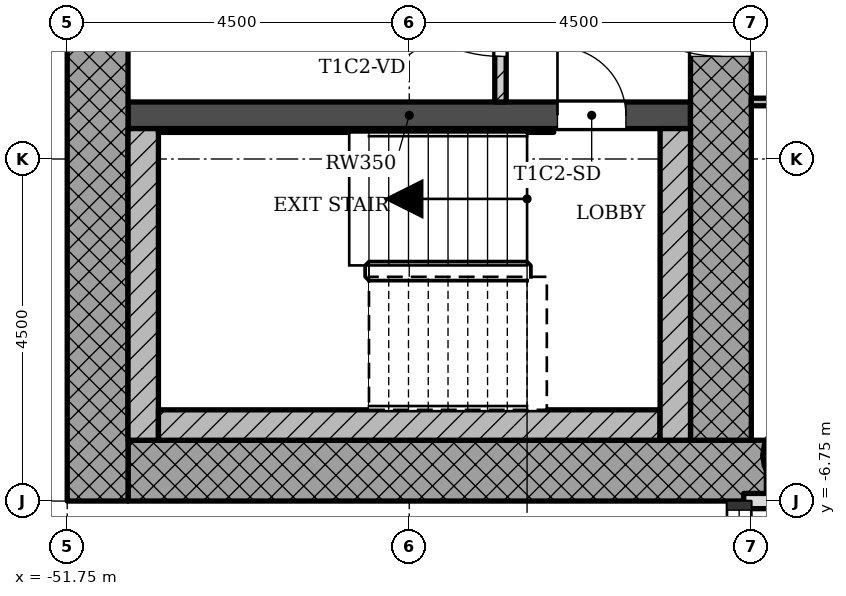
"""IFC4 building model, lengths in metres.
Left out: names, types, materials, properties, quantities, classifications, styles, units other than length and angle.
Written with IfcOpenShell. Run it as: python <this file> out.ifc"""

import sys

from ifc_helpers import new_model, si_unit, direction, frame, frame_2d, origin, origin_2d, place, context, subcontext, project, spatial, rectangle, hollow_circle, extrude, element, fill, save


model = new_model("IFC4")
c1 = context("Model", 3, precision=1e-05, world=origin(), true_north=direction((0.0, 1.0)))
c2 = subcontext(c1, "Body", "Model", "MODEL_VIEW")
j1 = project(units=[si_unit("LENGTHUNIT", "METRE"), si_unit("PLANEANGLEUNIT", "RADIAN")], contexts=[c1])
p1 = place(None, origin())
s1 = spatial("IfcSite", under=j1, at=p1, CompositionType="ELEMENT")
p2 = place(p1, origin())
s2 = spatial("IfcBuilding", under=s1, at=p2, CompositionType="ELEMENT")
p3 = place(p2, frame((0.0, 0.0, 140.5)))
s3 = spatial("IfcBuildingStorey", under=s2, at=p3, CompositionType="ELEMENT", Elevation=140.5)
p4 = place(p3, frame((-50.95, -6.35, 0.0), z_axis=(0.0, 0.0, 1.0), x_axis=(1.0, 0.0, 0.0)))
e1 = element("IfcWall", 1, at=p4, inside=s3, PredefinedType="SHEAR", context=c2, shape_type="SweptSolid", body=[
    extrude(rectangle(XDim=8.398, YDim=0.8, at=frame_2d((4.199, 0.0))), origin(), (0.0, 0.0, 1.0), 3.4),
])
p5 = place(p3, frame((-43.15, -5.95, 0.0), z_axis=(0.0, 0.0, 1.0), x_axis=(0.0, 1.0, 0.0)))
e2 = element("IfcWall", 2, at=p5, inside=s3, PredefinedType="SHEAR", context=c2, shape_type="SweptSolid", body=[
    extrude(rectangle(XDim=12.7, YDim=0.8, at=frame_2d((6.35, 0.0))), origin(), (0.0, 0.0, 1.0), 3.4),
])
p6 = place(p5, frame((5.05, 0.0, 0.0)))
e3 = element("IfcOpeningElement", 3, at=p6, cuts=e2, PredefinedType="OPENING", context=c2, shape_type="SweptSolid", body=[
    extrude(rectangle(XDim=1.8, YDim=2.1, at=frame_2d((0.9, 1.05))), frame((0.0, 0.41, 0.0), z_axis=(0.0, -1.0, 0.0), x_axis=(1.0, 0.0, 0.0)), (0.0, 0.0, 1.0), 0.82),
])
p7 = place(p3, frame((-51.35, 5.95, 0.0), z_axis=(0.0, 0.0, 1.0), x_axis=(0.0, -1.0, 0.0)))
e4 = element("IfcWall", 4, at=p7, inside=s3, PredefinedType="SHEAR", context=c2, shape_type="SweptSolid", body=[
    extrude(rectangle(XDim=12.7, YDim=0.8, at=frame_2d((6.35, 0.0))), origin(), (0.0, 0.0, 1.0), 3.4),
])
p8 = place(p7, frame((5.5, 0.0, 0.45)))
e5 = element("IfcOpeningElement", 5, at=p8, cuts=e4, PredefinedType="OPENING", context=c2, shape_type="SweptSolid", body=[
    extrude(rectangle(XDim=0.9, YDim=2.4, at=frame_2d((0.45, 1.2))), frame((0.0, 0.41, 0.0), z_axis=(0.0, -1.0, 0.0), x_axis=(1.0, 0.0, 0.0)), (0.0, 0.0, 1.0), 0.82),
])
p9 = place(p3, frame((-50.95, -1.675, 0.0), z_axis=(0.0, 0.0, 1.0), x_axis=(1.0, 0.0, 0.0)))
e6 = element("IfcWall", 6, at=p9, inside=s3, PredefinedType="SHEAR", context=c2, shape_type="SweptSolid", body=[
    extrude(rectangle(XDim=7.4, YDim=0.35, at=frame_2d((3.7, 0.0))), origin(), (0.0, 0.0, 1.0), 3.4),
])
p10 = place(p9, frame((5.65, 0.0, 0.0)))
e7 = element("IfcOpeningElement", 7, at=p10, cuts=e6, PredefinedType="OPENING", context=c2, shape_type="SweptSolid", body=[
    extrude(rectangle(XDim=0.9, YDim=2.1, at=frame_2d((0.45, 1.05))), frame((0.0, 0.185, 0.0), z_axis=(0.0, -1.0, 0.0), x_axis=(1.0, 0.0, 0.0)), (0.0, 0.0, 1.0), 0.37),
])
p11 = place(p3, frame((-42.15, -6.15, 0.0), z_axis=(0.0, 0.0, 1.0), x_axis=(1.0, 0.0, 0.0)))
e8 = element("IfcColumn", 8, at=p11, inside=s3, PredefinedType="COLUMN", context=c2, shape_type="SweptSolid", body=[
    extrude(hollow_circle(Radius=0.45, WallThickness=0.032, at=origin_2d()), origin(), (0.0, 0.0, 1.0), 3.4),
])
p12 = place(p3, frame((-46.05, 1.5, 0.0), z_axis=(0.0, 0.0, 1.0), x_axis=(0.0, -1.0, 0.0)))
e9 = element("IfcWall", 9, at=p12, inside=s3, PredefinedType="PARTITIONING", context=c2, shape_type="SweptSolid", body=[
    extrude(rectangle(XDim=3.0, YDim=0.15, at=frame_2d((1.5, 0.0))), origin(), (0.0, 0.0, 1.0), 3.0),
])
p13 = place(p12, frame((0.6, 0.0, 0.0)))
e10 = element("IfcOpeningElement", 10, at=p13, cuts=e9, PredefinedType="OPENING", context=c2, shape_type="SweptSolid", body=[
    extrude(rectangle(XDim=1.8, YDim=2.1, at=frame_2d((0.9, 1.05))), frame((0.0, 0.085, 0.0), z_axis=(0.0, -1.0, 0.0), x_axis=(1.0, 0.0, 0.0)), (0.0, 0.0, 1.0), 0.17),
])
p14 = place(p3, frame((-42.85, -6.75, 0.0), z_axis=(0.0, 0.0, 1.0), x_axis=(1.0, 0.0, 0.0)))
e11 = element("IfcWall", 11, at=p14, inside=s3, PredefinedType="SOLIDWALL", context=c2, shape_type="SweptSolid", body=[
    extrude(rectangle(XDim=13.7, YDim=0.2, at=frame_2d((6.85, 0.0))), origin(), (0.0, 0.0, 1.0), 3.0),
])
p15 = place(p14, frame((6.4, 0.0, 0.0)))
e12 = element("IfcOpeningElement", 12, at=p15, cuts=e11, PredefinedType="OPENING", context=c2, shape_type="SweptSolid", body=[
    extrude(rectangle(XDim=0.9, YDim=2.1, at=frame_2d((0.45, 1.05))), frame((0.0, 0.11, 0.0), z_axis=(0.0, -1.0, 0.0), x_axis=(1.0, 0.0, 0.0)), (0.0, 0.0, 1.0), 0.22),
])
p16 = place(p3, frame((-42.75, -1.5, 0.0), z_axis=(0.0, 0.0, 1.0), x_axis=(1.0, 0.0, 0.0)))
e13 = element("IfcWall", 13, at=p16, inside=s3, PredefinedType="PARTITIONING", context=c2, shape_type="SweptSolid", body=[
    extrude(rectangle(XDim=2.25, YDim=0.1, at=frame_2d((1.125, 0.0))), origin(), (0.0, 0.0, 1.0), 3.0),
])
p17 = place(p3, frame((-50.75, -1.85, 0.0), z_axis=(0.0, 0.0, 1.0), x_axis=(0.0, -1.0, 0.0)))
e14 = element("IfcWall", 14, at=p17, inside=s3, PredefinedType="SHEAR", context=c2, shape_type="SweptSolid", body=[
    extrude(rectangle(XDim=4.1, YDim=0.4, at=frame_2d((2.05, 0.0))), origin(), (0.0, 0.0, 1.0), 3.4),
])
p18 = place(p3, frame((-43.95, -5.75, 0.0), z_axis=(0.0, 0.0, 1.0), x_axis=(-1.0, 0.0, 0.0)))
e15 = element("IfcWall", 15, at=p18, inside=s3, PredefinedType="SHEAR", context=c2, shape_type="SweptSolid", body=[
    extrude(rectangle(XDim=6.6, YDim=0.4, at=frame_2d((3.3, 0.0))), origin(), (0.0, 0.0, 1.0), 3.4),
])
p19 = place(p3, frame((-43.75, -1.85, 0.0), z_axis=(0.0, 0.0, 1.0), x_axis=(0.0, -1.0, 0.0)))
e16 = element("IfcWall", 16, at=p19, inside=s3, PredefinedType="SHEAR", context=c2, shape_type="SweptSolid", body=[
    extrude(rectangle(XDim=4.1, YDim=0.4, at=frame_2d((2.05, 0.0))), origin(), (0.0, 0.0, 1.0), 3.4),
])
p20 = place(p3, frame((-45.35, -1.875, 0.0), z_axis=(0.0, 0.0, 1.0), x_axis=(-1.0, 0.0, 0.0)))
e17 = element("IfcWall", 17, at=p20, inside=s3, PredefinedType="SHEAR", context=c2, shape_type="SweptSolid", body=[
    extrude(rectangle(XDim=5.2, YDim=0.05, at=frame_2d((2.6, 0.0))), origin(), (0.0, 0.0, 1.0), 3.4),
])
p21 = place(p13, origin())
e18 = element("IfcDoor", 18, at=p21, inside=s3, OperationType="SINGLE_SWING_LEFT", PredefinedType="DOOR", context=c2, shape_type="SweptSolid", body=[
    extrude(rectangle(XDim=1.8, YDim=2.1, at=frame_2d((0.9, 1.05))), frame((0.0, 0.025, 0.0), z_axis=(0.0, -1.0, 0.0), x_axis=(1.0, 0.0, 0.0)), (0.0, 0.0, 1.0), 0.05),
])
fill(e10, e18)
p22 = place(p10, origin())
e19 = element("IfcDoor", 19, at=p22, inside=s3, OperationType="SINGLE_SWING_RIGHT", PredefinedType="DOOR", context=c2, shape_type="SweptSolid", body=[
    extrude(rectangle(XDim=0.9, YDim=2.1, at=frame_2d((0.45, 1.05))), frame((0.0, 0.025, 0.0), z_axis=(0.0, -1.0, 0.0), x_axis=(1.0, 0.0, 0.0)), (0.0, 0.0, 1.0), 0.05),
])
fill(e7, e19)
p23 = place(p6, origin())
e20 = element("IfcDoor", 20, at=p23, inside=s3, OperationType="SINGLE_SWING_LEFT", PredefinedType="DOOR", context=c2, shape_type="SweptSolid", body=[
    extrude(rectangle(XDim=1.8, YDim=2.1, at=frame_2d((0.9, 1.05))), frame((0.0, 0.025, 0.0), z_axis=(0.0, -1.0, 0.0), x_axis=(1.0, 0.0, 0.0)), (0.0, 0.0, 1.0), 0.05),
])
fill(e3, e20)
save(model, sys.argv[1])
